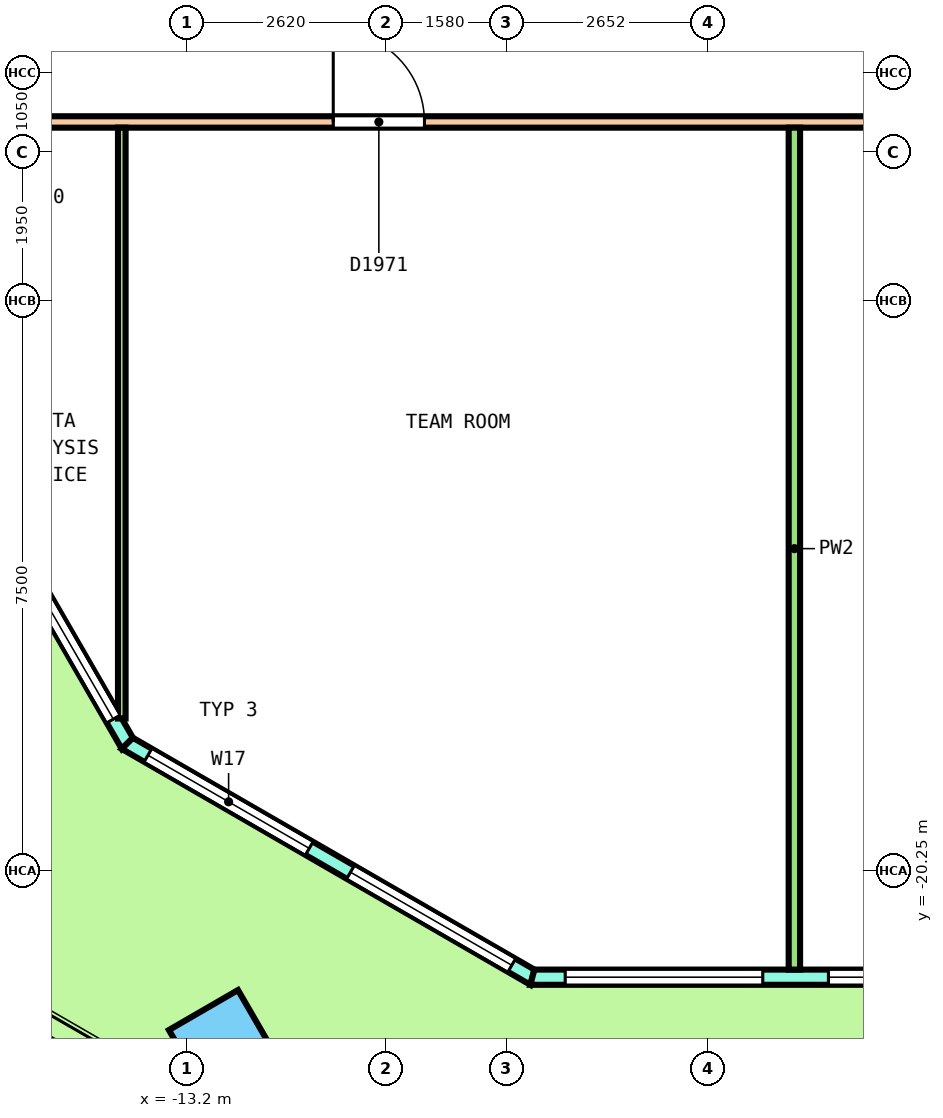
"""IFC4 building model, lengths in metres.
Left out: names, types, materials, properties, quantities, classifications, styles, units other than length and angle.
Written with IfcOpenShell. Run it as: python <this file> out.ifc"""

import sys

from ifc_helpers import new_model, si_unit, direction, frame, frame_2d, origin, origin_2d, place, context, subcontext, project, spatial, polyline, rectangle, outline, extrude, element, fill, save


model = new_model("IFC4")
c1 = context("Model", 3, precision=1e-05, world=origin(), true_north=direction((0.0, 1.0)))
c2 = subcontext(c1, "Body", "Model", "MODEL_VIEW")
j1 = project(units=[si_unit("LENGTHUNIT", "METRE"), si_unit("PLANEANGLEUNIT", "RADIAN")], contexts=[c1])
p1 = place(None, origin())
s1 = spatial("IfcSite", under=j1, at=p1, CompositionType="ELEMENT")
p2 = place(p1, origin())
s2 = spatial("IfcBuilding", under=s1, at=p2, CompositionType="ELEMENT")
p3 = place(p2, frame((0.0, 0.0, 219.4)))
s3 = spatial("IfcBuildingStorey", under=s2, at=p3, CompositionType="ELEMENT", Elevation=219.4)
p4 = place(p3, frame((-12.722, -22.538, 0.0), z_axis=(0.018113955825, -0.03141534774, 0.999342263957), x_axis=(0.865990228712, -0.499075001782, -0.031385767027)))
e1 = element("IfcColumn", 1, at=p4, inside=s3, PredefinedType="COLUMN", context=c2, shape_type="SweptSolid", body=[
    extrude(rectangle(XDim=1.05, YDim=1.05, at=origin_2d()), origin(), (0.0, 0.0, 1.0), 3.653),
])
p5 = place(p3, frame((-23.08, -2.825, 0.0), z_axis=(0.0, 0.0, 1.0), x_axis=(0.500005605865, -0.866022167212, 0.0)))
e2 = element("IfcWall", 2, at=p5, inside=s3, PredefinedType="SOLIDWALL", context=c2, shape_type="SweptSolid", body=[
    extrude(outline(polyline([(-0.027, -0.1), (0.987, -0.1), (2.0, -0.1), (3.013, -0.1), (4.026, -0.1), (5.04, -0.1), (6.053, -0.1), (7.066, -0.1), (8.08, -0.1), (9.093, -0.1), (10.106, -0.1), (11.12, -0.1), (12.133, -0.1), (13.146, -0.1), (14.16, -0.1), (15.173, -0.1), (16.187, -0.1), (17.2, -0.1), (18.213, -0.1), (18.159, 0.1), (17.152, 0.1), (16.145, 0.1), (15.137, 0.1), (14.13, 0.1), (13.123, 0.1), (12.115, 0.1), (11.108, 0.1), (10.101, 0.1), (9.093, 0.1), (8.086, 0.1), (7.078, 0.1), (6.071, 0.1), (5.064, 0.1), (4.056, 0.1), (3.049, 0.1), (2.042, 0.1), (1.034, 0.1), (0.027, 0.1), (-0.027, -0.1)])), origin(), (0.0, 0.0, 1.0), 3.7),
])
p6 = place(p5, frame((0.369, 0.0, 0.1)))
e3 = element("IfcOpeningElement", 3, at=p6, cuts=e2, PredefinedType="OPENING", context=c2, shape_type="SweptSolid", body=[
    extrude(rectangle(XDim=2.9, YDim=2.65, at=frame_2d((1.45, 1.325))), frame((0.0, 0.11, 0.0), z_axis=(0.0, -1.0, 0.0), x_axis=(1.0, 0.0, 0.0)), (0.0, 0.0, 1.0), 0.22),
])
p7 = place(p5, frame((4.006, 0.0, 0.1)))
e4 = element("IfcOpeningElement", 4, at=p7, cuts=e2, PredefinedType="OPENING", context=c2, shape_type="SweptSolid", body=[
    extrude(rectangle(XDim=2.9, YDim=2.65, at=frame_2d((1.45, 1.325))), frame((0.0, 0.11, 0.0), z_axis=(0.0, -1.0, 0.0), x_axis=(1.0, 0.0, 0.0)), (0.0, 0.0, 1.0), 0.22),
])
p8 = place(p5, frame((8.193, 0.0, 0.0)))
e5 = element("IfcOpeningElement", 5, at=p8, cuts=e2, PredefinedType="OPENING", context=c2, shape_type="SweptSolid", body=[
    extrude(rectangle(XDim=1.8, YDim=2.4, at=frame_2d((0.9, 1.2))), frame((0.0, 0.11, 0.0), z_axis=(0.0, -1.0, 0.0), x_axis=(1.0, 0.0, 0.0)), (0.0, 0.0, 1.0), 0.22),
])
p9 = place(p5, frame((8.193, 0.0, 2.55)))
e6 = element("IfcOpeningElement", 6, at=p9, cuts=e2, PredefinedType="OPENING", context=c2, shape_type="SweptSolid", body=[
    extrude(rectangle(XDim=1.8, YDim=0.2, at=frame_2d((0.9, 0.1))), frame((0.0, 0.11, 0.0), z_axis=(0.0, -1.0, 0.0), x_axis=(1.0, 0.0, 0.0)), (0.0, 0.0, 1.0), 0.22),
])
p10 = place(p5, frame((11.281, 0.0, 0.1)))
e7 = element("IfcOpeningElement", 7, at=p10, cuts=e2, PredefinedType="OPENING", context=c2, shape_type="SweptSolid", body=[
    extrude(rectangle(XDim=2.9, YDim=2.65, at=frame_2d((1.45, 1.325))), frame((0.0, 0.11, 0.0), z_axis=(0.0, -1.0, 0.0), x_axis=(1.0, 0.0, 0.0)), (0.0, 0.0, 1.0), 0.22),
])
p11 = place(p5, frame((14.918, 0.0, 0.1)))
e8 = element("IfcOpeningElement", 8, at=p11, cuts=e2, PredefinedType="OPENING", context=c2, shape_type="SweptSolid", body=[
    extrude(rectangle(XDim=2.9, YDim=2.65, at=frame_2d((1.45, 1.325))), frame((0.0, 0.11, 0.0), z_axis=(0.0, -1.0, 0.0), x_axis=(1.0, 0.0, 0.0)), (0.0, 0.0, 1.0), 0.22),
])
p12 = place(p3, frame((-13.986, -18.575, 0.0), z_axis=(0.0, 0.0, 1.0), x_axis=(0.866029647142, -0.499992650217, 0.0)))
e9 = element("IfcWall", 9, at=p12, inside=s3, PredefinedType="SOLIDWALL", context=c2, shape_type="SweptSolid", body=[
    extrude(outline(polyline([(-0.027, -0.1), (1.008, -0.1), (2.042, -0.1), (3.076, -0.1), (4.111, -0.1), (5.145, -0.1), (6.18, -0.1), (6.126, 0.1), (5.109, 0.1), (4.093, 0.1), (3.076, 0.1), (2.06, 0.1), (1.043, 0.1), (0.027, 0.1), (-0.027, -0.1)])), origin(), (0.0, 0.0, 1.0), 3.7),
])
p13 = place(p12, frame((0.313, 0.0, 0.1)))
e10 = element("IfcOpeningElement", 10, at=p13, cuts=e9, PredefinedType="OPENING", context=c2, shape_type="SweptSolid", body=[
    extrude(rectangle(XDim=2.45, YDim=2.65, at=frame_2d((1.225, 1.325))), frame((0.0, 0.11, 0.0), z_axis=(0.0, -1.0, 0.0), x_axis=(1.0, 0.0, 0.0)), (0.0, 0.0, 1.0), 0.22),
])
p14 = place(p12, frame((3.39, 0.0, 0.1)))
e11 = element("IfcOpeningElement", 11, at=p14, cuts=e9, PredefinedType="OPENING", context=c2, shape_type="SweptSolid", body=[
    extrude(rectangle(XDim=2.45, YDim=2.65, at=frame_2d((1.225, 1.325))), frame((0.0, 0.11, 0.0), z_axis=(0.0, -1.0, 0.0), x_axis=(1.0, 0.0, 0.0)), (0.0, 0.0, 1.0), 0.22),
])
p15 = place(p3, frame((-8.658, -21.651, 0.0), z_axis=(0.0, 0.0, 1.0), x_axis=(1.0, 0.0, 0.0)))
e12 = element("IfcWall", 12, at=p15, inside=s3, PredefinedType="SOLIDWALL", context=c2, shape_type="SweptSolid", body=[
    extrude(outline(polyline([(-0.027, -0.1), (0.995, -0.1), (2.017, -0.1), (3.038, -0.1), (4.06, -0.1), (5.082, -0.1), (6.104, -0.1), (7.125, -0.1), (8.147, -0.1), (9.168, -0.1), (10.19, -0.1), (11.212, -0.1), (12.234, -0.1), (13.255, -0.1), (14.277, -0.1), (15.299, -0.1), (16.321, -0.1), (17.342, -0.1), (17.289, 0.1), (16.273, 0.1), (15.258, 0.1), (14.242, 0.1), (13.227, 0.1), (12.212, 0.1), (11.196, 0.1), (10.181, 0.1), (9.166, 0.1), (8.15, 0.1), (7.135, 0.1), (6.119, 0.1), (5.104, 0.1), (4.088, 0.1), (3.073, 0.1), (2.058, 0.1), (1.042, 0.1), (0.027, 0.1), (-0.027, -0.1)])), origin(), (0.0, 0.0, 1.0), 3.7),
])
p16 = place(p15, frame((0.432, 0.0, 0.1)))
e13 = element("IfcOpeningElement", 13, at=p16, cuts=e12, PredefinedType="OPENING", context=c2, shape_type="SweptSolid", body=[
    extrude(rectangle(XDim=2.6, YDim=2.65, at=frame_2d((1.3, 1.325))), frame((0.0, 0.11, 0.0), z_axis=(0.0, -1.0, 0.0), x_axis=(1.0, 0.0, 0.0)), (0.0, 0.0, 1.0), 0.22),
])
p17 = place(p15, frame((3.895, 0.0, 0.1)))
e14 = element("IfcOpeningElement", 14, at=p17, cuts=e12, PredefinedType="OPENING", context=c2, shape_type="SweptSolid", body=[
    extrude(rectangle(XDim=2.6, YDim=2.65, at=frame_2d((1.3, 1.325))), frame((0.0, 0.11, 0.0), z_axis=(0.0, -1.0, 0.0), x_axis=(1.0, 0.0, 0.0)), (0.0, 0.0, 1.0), 0.22),
])
p18 = place(p15, frame((7.758, 0.0, 0.0)))
e15 = element("IfcOpeningElement", 15, at=p18, cuts=e12, PredefinedType="OPENING", context=c2, shape_type="SweptSolid", body=[
    extrude(rectangle(XDim=1.8, YDim=2.4, at=frame_2d((0.9, 1.2))), frame((0.0, 0.11, 0.0), z_axis=(0.0, -1.0, 0.0), x_axis=(1.0, 0.0, 0.0)), (0.0, 0.0, 1.0), 0.22),
])
p19 = place(p15, frame((7.758, 0.0, 2.55)))
e16 = element("IfcOpeningElement", 16, at=p19, cuts=e12, PredefinedType="OPENING", context=c2, shape_type="SweptSolid", body=[
    extrude(rectangle(XDim=1.8, YDim=0.2, at=frame_2d((0.9, 0.1))), frame((0.0, 0.11, 0.0), z_axis=(0.0, -1.0, 0.0), x_axis=(1.0, 0.0, 0.0)), (0.0, 0.0, 1.0), 0.22),
])
p20 = place(p15, frame((10.821, 0.0, 0.1)))
e17 = element("IfcOpeningElement", 17, at=p20, cuts=e12, PredefinedType="OPENING", context=c2, shape_type="SweptSolid", body=[
    extrude(rectangle(XDim=2.6, YDim=2.65, at=frame_2d((1.3, 1.325))), frame((0.0, 0.11, 0.0), z_axis=(0.0, -1.0, 0.0), x_axis=(1.0, 0.0, 0.0)), (0.0, 0.0, 1.0), 0.22),
])
p21 = place(p15, frame((14.284, 0.0, 0.1)))
e18 = element("IfcOpeningElement", 18, at=p21, cuts=e12, PredefinedType="OPENING", context=c2, shape_type="SweptSolid", body=[
    extrude(rectangle(XDim=2.6, YDim=2.65, at=frame_2d((1.3, 1.325))), frame((0.0, 0.11, 0.0), z_axis=(0.0, -1.0, 0.0), x_axis=(1.0, 0.0, 0.0)), (0.0, 0.0, 1.0), 0.22),
])
p22 = place(p3, frame((-15.45, -10.4, 0.0), z_axis=(0.0, 0.0, 1.0), x_axis=(1.0, 0.0, 0.0)))
e19 = element("IfcWall", 19, at=p22, inside=s3, PredefinedType="PARTITIONING", context=c2, shape_type="SweptSolid", body=[
    extrude(rectangle(XDim=31.025, YDim=0.15, at=frame_2d((15.512, 0.0))), origin(), (0.0, 0.0, 1.0), 2.8),
])
p23 = place(p22, frame((4.173, 0.0, 0.0)))
e20 = element("IfcOpeningElement", 20, at=p23, cuts=e19, PredefinedType="OPENING", context=c2, shape_type="SweptSolid", body=[
    extrude(rectangle(XDim=1.2, YDim=2.1, at=frame_2d((0.6, 1.05))), frame((0.0, 0.085, 0.0), z_axis=(0.0, -1.0, 0.0), x_axis=(1.0, 0.0, 0.0)), (0.0, 0.0, 1.0), 0.17),
])
p24 = place(p22, frame((18.386, 0.0, 0.0)))
e21 = element("IfcOpeningElement", 21, at=p24, cuts=e19, PredefinedType="OPENING", context=c2, shape_type="SweptSolid", body=[
    extrude(rectangle(XDim=1.2, YDim=2.1, at=frame_2d((0.6, 1.05))), frame((0.0, 0.085, 0.0), z_axis=(0.0, -1.0, 0.0), x_axis=(1.0, 0.0, 0.0)), (0.0, 0.0, 1.0), 0.17),
])
p25 = place(p22, frame((26.743, 0.0, 0.0)))
e22 = element("IfcOpeningElement", 22, at=p25, cuts=e19, PredefinedType="OPENING", context=c2, shape_type="SweptSolid", body=[
    extrude(rectangle(XDim=1.2, YDim=2.1, at=frame_2d((0.6, 1.05))), frame((0.0, 0.085, 0.0), z_axis=(0.0, -1.0, 0.0), x_axis=(1.0, 0.0, 0.0)), (0.0, 0.0, 1.0), 0.17),
])
p26 = place(p3, frame((-5.211, -21.552, 0.0), z_axis=(0.0, 0.0, 1.0), x_axis=(0.0, 1.0, 0.0)))
e23 = element("IfcWall", 23, at=p26, inside=s3, PredefinedType="PARTITIONING", context=c2, shape_type="SweptSolid", body=[
    extrude(rectangle(XDim=11.076, YDim=0.15, at=frame_2d((5.538, 0.0))), origin(), (0.0, 0.0, 1.0), 2.8),
])
p27 = place(p3, frame((-14.06, -18.248, 0.0), z_axis=(0.0, 0.0, 1.0), x_axis=(0.0, 1.0, 0.0)))
e24 = element("IfcWall", 24, at=p27, inside=s3, PredefinedType="PARTITIONING", context=c2, shape_type="SweptSolid", body=[
    extrude(rectangle(XDim=7.773, YDim=0.1, at=frame_2d((3.887, 0.0))), origin(), (0.0, 0.0, 1.0), 2.8),
])
p28 = place(p11, origin())
e25 = element("IfcWindow", 25, at=p28, inside=s3, PartitioningType="SINGLE_PANEL", PredefinedType="WINDOW", context=c2, shape_type="SweptSolid", body=[
    extrude(rectangle(XDim=2.9, YDim=2.65, at=frame_2d((1.45, 1.325))), frame((0.0, 0.03, 0.0), z_axis=(0.0, -1.0, 0.0), x_axis=(1.0, 0.0, 0.0)), (0.0, 0.0, 1.0), 0.06),
])
fill(e8, e25)
p29 = place(p13, origin())
e26 = element("IfcWindow", 26, at=p29, inside=s3, PartitioningType="SINGLE_PANEL", PredefinedType="WINDOW", context=c2, shape_type="SweptSolid", body=[
    extrude(rectangle(XDim=2.45, YDim=2.65, at=frame_2d((1.225, 1.325))), frame((0.0, 0.03, 0.0), z_axis=(0.0, -1.0, 0.0), x_axis=(1.0, 0.0, 0.0)), (0.0, 0.0, 1.0), 0.06),
])
fill(e10, e26)
p30 = place(p14, origin())
e27 = element("IfcWindow", 27, at=p30, inside=s3, PartitioningType="SINGLE_PANEL", PredefinedType="WINDOW", context=c2, shape_type="SweptSolid", body=[
    extrude(rectangle(XDim=2.45, YDim=2.65, at=frame_2d((1.225, 1.325))), frame((0.0, 0.03, 0.0), z_axis=(0.0, -1.0, 0.0), x_axis=(1.0, 0.0, 0.0)), (0.0, 0.0, 1.0), 0.06),
])
fill(e11, e27)
p31 = place(p16, origin())
e28 = element("IfcWindow", 28, at=p31, inside=s3, PartitioningType="SINGLE_PANEL", PredefinedType="WINDOW", context=c2, shape_type="SweptSolid", body=[
    extrude(rectangle(XDim=2.6, YDim=2.65, at=frame_2d((1.3, 1.325))), frame((0.0, 0.03, 0.0), z_axis=(0.0, -1.0, 0.0), x_axis=(1.0, 0.0, 0.0)), (0.0, 0.0, 1.0), 0.06),
])
fill(e13, e28)
p32 = place(p17, origin())
e29 = element("IfcWindow", 29, at=p32, inside=s3, PartitioningType="SINGLE_PANEL", PredefinedType="WINDOW", context=c2, shape_type="SweptSolid", body=[
    extrude(rectangle(XDim=2.6, YDim=2.65, at=frame_2d((1.3, 1.325))), frame((0.0, 0.03, 0.0), z_axis=(0.0, -1.0, 0.0), x_axis=(1.0, 0.0, 0.0)), (0.0, 0.0, 1.0), 0.06),
])
fill(e14, e29)
p33 = place(p23, origin())
e30 = element("IfcDoor", 30, at=p33, inside=s3, OperationType="DOUBLE_DOOR_SINGLE_SWING", PredefinedType="DOOR", context=c2, shape_type="SweptSolid", body=[
    extrude(rectangle(XDim=1.2, YDim=2.1, at=frame_2d((0.6, 1.05))), frame((0.0, 0.025, 0.0), z_axis=(0.0, -1.0, 0.0), x_axis=(1.0, 0.0, 0.0)), (0.0, 0.0, 1.0), 0.05),
])
fill(e20, e30)
save(model, sys.argv[1])
